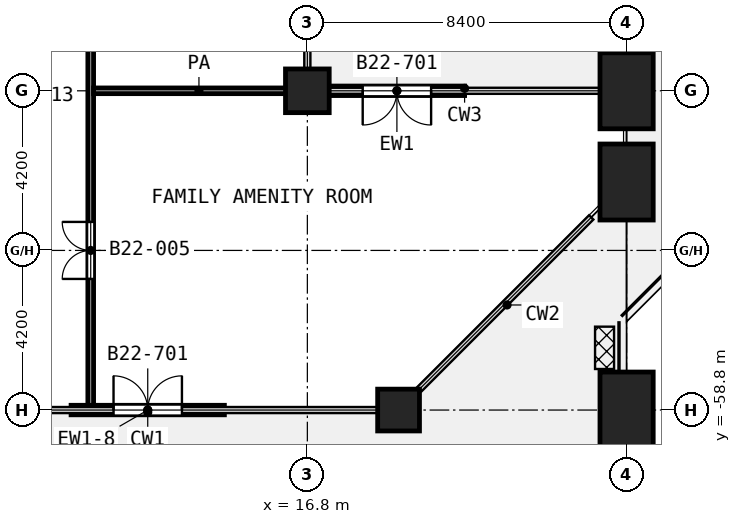
"""IFC4 building model, lengths in metres.
Left out: names, types, materials, properties, quantities, classifications, styles, units other than length and angle.
Written with IfcOpenShell. Run it as: python <this file> out.ifc"""

import sys

from ifc_helpers import new_model, si_unit, direction, frame, frame_2d, origin, origin_2d, place, context, subcontext, project, spatial, rectangle, extrude, element, fill, save


model = new_model("IFC4")
c1 = context("Model", 3, precision=1e-05, world=origin(), true_north=direction((0.0, 1.0)))
c2 = subcontext(c1, "Body", "Model", "MODEL_VIEW")
j1 = project(units=[si_unit("LENGTHUNIT", "METRE"), si_unit("PLANEANGLEUNIT", "RADIAN")], contexts=[c1])
p1 = place(None, origin())
s1 = spatial("IfcSite", under=j1, at=p1, CompositionType="ELEMENT")
p2 = place(p1, origin())
s2 = spatial("IfcBuilding", under=s1, at=p2, CompositionType="ELEMENT")
p3 = place(p2, frame((0.0, 0.0, 98.8)))
s3 = spatial("IfcBuildingStorey", under=s2, at=p3, CompositionType="ELEMENT", Elevation=98.8)
p4 = place(p3, frame((16.8, -50.4, 0.0), z_axis=(0.0, 0.0, 1.0), x_axis=(1.0, 0.0, 0.0)))
e1 = element("IfcColumn", 1, at=p4, inside=s3, PredefinedType="COLUMN", context=c2, shape_type="SweptSolid", body=[
    extrude(rectangle(XDim=1.15, YDim=1.15, at=origin_2d()), origin(), (0.0, 0.0, 1.0), 4.2),
])
p5 = place(p3, frame((25.2, -52.8, 0.0), z_axis=(0.0, 0.0, 1.0), x_axis=(0.0, -1.0, 0.0)))
e2 = element("IfcColumn", 2, at=p5, inside=s3, PredefinedType="COLUMN", context=c2, shape_type="SweptSolid", body=[
    extrude(rectangle(XDim=2.0, YDim=1.4, at=origin_2d()), origin(), (0.0, 0.0, 1.0), 4.2),
])
p6 = place(p3, frame((19.2, -58.8, 0.0), z_axis=(0.0, 0.0, 1.0), x_axis=(1.0, 0.0, 0.0)))
e3 = element("IfcColumn", 3, at=p6, inside=s3, PredefinedType="COLUMN", context=c2, shape_type="SweptSolid", body=[
    extrude(rectangle(XDim=1.1, YDim=1.1, at=origin_2d()), origin(), (0.0, 0.0, 1.0), 4.2),
])
for number, where, z_axis, x_axis in (
    (4, (25.2, -58.8, 0.0), (0.0, 0.0, 1.0), (0.0, -1.0, 0.0)),
    (5, (25.2, -50.4, 0.0), (0.0, 0.0, 1.0), (0.0, -1.0, 0.0)),
):
    element("IfcColumn", number, at=place(p3, frame(where, z_axis=z_axis, x_axis=x_axis)), inside=s3, PredefinedType="COLUMN", context=c2, shape_type="SweptSolid", body=[
        extrude(rectangle(XDim=2.0, YDim=1.4, at=origin_2d()), origin(), (0.0, 0.0, 1.0), 4.2),
    ])
p7 = place(p3, frame((20.938, -50.4, 0.0), z_axis=(0.0, 0.0, 1.0), x_axis=(-1.0, 0.0, 0.0)))
e6 = element("IfcWall", 6, at=p7, inside=s3, PredefinedType="SOLIDWALL", context=c2, shape_type="SweptSolid", body=[
    extrude(rectangle(XDim=3.562, YDim=0.25, at=frame_2d((1.781, 0.0))), origin(), (0.0, 0.0, 1.0), 3.46),
])
p8 = place(p7, frame((0.881, 0.0, 0.0)))
e7 = element("IfcOpeningElement", 7, at=p8, cuts=e6, PredefinedType="OPENING", context=c2, shape_type="SweptSolid", body=[
    extrude(rectangle(XDim=1.8, YDim=2.1, at=frame_2d((0.9, 1.05))), frame((0.0, 0.135, 0.0), z_axis=(0.0, -1.0, 0.0), x_axis=(1.0, 0.0, 0.0)), (0.0, 0.0, 1.0), 0.27),
])
p9 = place(p3, frame((10.583, -58.8, 0.0), z_axis=(0.0, 0.0, 1.0), x_axis=(1.0, 0.0, 0.0)))
e8 = element("IfcWall", 8, at=p9, inside=s3, PredefinedType="SOLIDWALL", context=c2, shape_type="SweptSolid", body=[
    extrude(rectangle(XDim=4.033, YDim=0.25, at=frame_2d((2.017, 0.0))), origin(), (0.0, 0.0, 1.0), 2.58),
])
p10 = place(p9, frame((1.117, 0.0, 0.0)))
e9 = element("IfcOpeningElement", 9, at=p10, cuts=e8, PredefinedType="OPENING", context=c2, shape_type="SweptSolid", body=[
    extrude(rectangle(XDim=1.8, YDim=2.1, at=frame_2d((0.9, 1.05))), frame((0.0, 0.135, 0.0), z_axis=(0.0, -1.0, 0.0), x_axis=(1.0, 0.0, 0.0)), (0.0, 0.0, 1.0), 0.27),
])
p11 = place(p3, frame((11.175, -50.4, 0.0), z_axis=(0.0, 0.0, 1.0), x_axis=(1.0, 0.0, 0.0)))
e10 = element("IfcWall", 10, at=p11, inside=s3, PredefinedType="PARTITIONING", context=c2, shape_type="SweptSolid", body=[
    extrude(rectangle(XDim=5.545, YDim=0.15, at=frame_2d((2.772, 0.0))), origin(), (0.0, 0.0, 1.0), 3.6),
])
p12 = place(p3, frame((11.1, -58.72, 0.0), z_axis=(0.0, 0.0, 1.0), x_axis=(0.0, 1.0, 0.0)))
e11 = element("IfcWall", 11, at=p12, inside=s3, PredefinedType="PARTITIONING", context=c2, shape_type="SweptSolid", body=[
    extrude(rectangle(XDim=29.32, YDim=0.15, at=frame_2d((14.66, 0.0))), origin(), (0.0, 0.0, 1.0), 2.7),
])
p13 = place(p12, frame((19.87, 0.0, 0.0)))
e12 = element("IfcOpeningElement", 12, at=p13, cuts=e11, PredefinedType="OPENING", context=c2, shape_type="SweptSolid", body=[
    extrude(rectangle(XDim=1.5, YDim=2.1, at=frame_2d((0.75, 1.05))), frame((0.0, 0.085, 0.0), z_axis=(0.0, -1.0, 0.0), x_axis=(1.0, 0.0, 0.0)), (0.0, 0.0, 1.0), 0.17),
])
p14 = place(p12, frame((9.62, 0.0, 0.0)))
e13 = element("IfcOpeningElement", 13, at=p14, cuts=e11, PredefinedType="OPENING", context=c2, shape_type="SweptSolid", body=[
    extrude(rectangle(XDim=1.0, YDim=2.1, at=frame_2d((0.5, 1.05))), frame((0.0, 0.085, 0.0), z_axis=(0.0, -1.0, 0.0), x_axis=(1.0, 0.0, 0.0)), (0.0, 0.0, 1.0), 0.17),
])
p15 = place(p12, frame((3.37, 0.0, 0.0)))
e14 = element("IfcOpeningElement", 14, at=p15, cuts=e11, PredefinedType="OPENING", context=c2, shape_type="SweptSolid", body=[
    extrude(rectangle(XDim=1.5, YDim=2.1, at=frame_2d((0.75, 1.05))), frame((0.0, 0.085, 0.0), z_axis=(0.0, -1.0, 0.0), x_axis=(1.0, 0.0, 0.0)), (0.0, 0.0, 1.0), 0.17),
])
p16 = place(p8, origin())
e15 = element("IfcDoor", 15, at=p16, inside=s3, OperationType="DOUBLE_DOOR_SINGLE_SWING", PredefinedType="DOOR", context=c2, shape_type="SweptSolid", body=[
    extrude(rectangle(XDim=1.8, YDim=2.1, at=frame_2d((0.9, 1.05))), frame((0.0, 0.025, 0.0), z_axis=(0.0, -1.0, 0.0), x_axis=(1.0, 0.0, 0.0)), (0.0, 0.0, 1.0), 0.05),
])
fill(e7, e15)
p17 = place(p10, origin())
e16 = element("IfcDoor", 16, at=p17, inside=s3, OperationType="DOUBLE_DOOR_SINGLE_SWING", PredefinedType="DOOR", context=c2, shape_type="SweptSolid", body=[
    extrude(rectangle(XDim=1.8, YDim=2.1, at=frame_2d((0.9, 1.05))), frame((0.0, 0.025, 0.0), z_axis=(0.0, -1.0, 0.0), x_axis=(1.0, 0.0, 0.0)), (0.0, 0.0, 1.0), 0.05),
])
fill(e9, e16)
p18 = place(p15, origin())
e17 = element("IfcDoor", 17, at=p18, inside=s3, OperationType="DOUBLE_DOOR_SINGLE_SWING", PredefinedType="DOOR", context=c2, shape_type="SweptSolid", body=[
    extrude(rectangle(XDim=1.5, YDim=2.1, at=frame_2d((0.75, 1.05))), frame((0.0, 0.025, 0.0), z_axis=(0.0, -1.0, 0.0), x_axis=(1.0, 0.0, 0.0)), (0.0, 0.0, 1.0), 0.05),
])
fill(e14, e17)
save(model, sys.argv[1])
